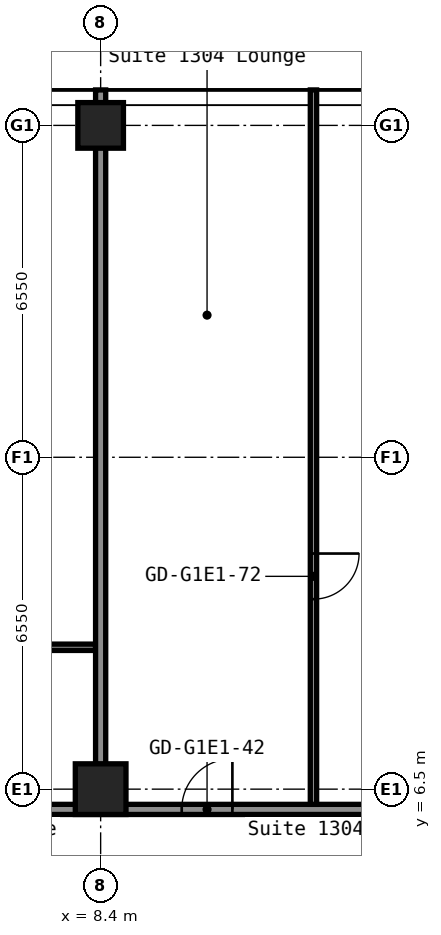
"""IFC4 building model, lengths in metres.
Left out: names, types, materials, properties, quantities, classifications, styles, units other than length and angle.
Written with IfcOpenShell. Run it as: python <this file> out.ifc"""

import sys

from ifc_helpers import new_model, si_unit, direction, frame, frame_2d, origin, origin_2d, place, context, subcontext, project, spatial, rectangle, hollow_rectangle, extrude, element, fill, save


model = new_model("IFC4")
c1 = context("Model", 3, precision=1e-05, world=origin(), true_north=direction((0.0, 1.0)))
c2 = subcontext(c1, "Body", "Model", "MODEL_VIEW")
j1 = project(units=[si_unit("LENGTHUNIT", "METRE"), si_unit("PLANEANGLEUNIT", "RADIAN")], contexts=[c1])
p1 = place(None, origin())
s1 = spatial("IfcSite", under=j1, at=p1, CompositionType="ELEMENT")
p2 = place(p1, origin())
s2 = spatial("IfcBuilding", under=s1, at=p2, CompositionType="ELEMENT")
p3 = place(p2, frame((0.0, 0.0, 48.6)))
s3 = spatial("IfcBuildingStorey", under=s2, at=p3, CompositionType="ELEMENT", Elevation=48.6)
p4 = place(p3, frame((8.4, 6.5, 0.0), z_axis=(0.0, 0.0, 1.0), x_axis=(1.0, 0.0, 0.0)))
e1 = element("IfcColumn", 1, at=p4, inside=s3, PredefinedType="COLUMN", context=c2, shape_type="SweptSolid", body=[
    extrude(hollow_rectangle(XDim=1.0, YDim=1.0, WallThickness=0.04, at=origin_2d()), origin(), (0.0, 0.0, 1.0), 2.8),
])
p5 = place(p3, frame((8.4, 19.6, 0.0), z_axis=(0.0, 0.0, 1.0), x_axis=(1.0, 0.0, 0.0)))
e2 = element("IfcColumn", 2, at=p5, inside=s3, PredefinedType="COLUMN", context=c2, shape_type="SweptSolid", body=[
    extrude(hollow_rectangle(XDim=0.9, YDim=0.9, WallThickness=0.036, at=origin_2d()), origin(), (0.0, 0.0, 1.0), 2.8),
])
p6 = place(p3, frame((-16.8, 6.1, 0.0), z_axis=(0.0, 0.0, 1.0), x_axis=(1.0, 0.0, 0.0)))
e3 = element("IfcWall", 3, at=p6, inside=s3, PredefinedType="PARTITIONING", context=c2, shape_type="SweptSolid", body=[
    extrude(rectangle(XDim=33.6, YDim=0.2, at=frame_2d((16.8, 0.0))), origin(), (0.0, 0.0, 1.0), 2.8),
])
p7 = place(p6, frame((1.6, 0.0, 0.0)))
e4 = element("IfcOpeningElement", 4, at=p7, cuts=e3, PredefinedType="OPENING", context=c2, shape_type="SweptSolid", body=[
    extrude(rectangle(XDim=1.0, YDim=2.1, at=frame_2d((0.5, 1.05))), frame((0.0, 0.11, 0.0), z_axis=(0.0, -1.0, 0.0), x_axis=(1.0, 0.0, 0.0)), (0.0, 0.0, 1.0), 0.22),
])
p8 = place(p6, frame((10.0, 0.0, 0.0)))
e5 = element("IfcOpeningElement", 5, at=p8, cuts=e3, PredefinedType="OPENING", context=c2, shape_type="SweptSolid", body=[
    extrude(rectangle(XDim=1.0, YDim=2.1, at=frame_2d((0.5, 1.05))), frame((0.0, 0.11, 0.0), z_axis=(0.0, -1.0, 0.0), x_axis=(1.0, 0.0, 0.0)), (0.0, 0.0, 1.0), 0.22),
])
p9 = place(p6, frame((18.4, 0.0, 0.0)))
e6 = element("IfcOpeningElement", 6, at=p9, cuts=e3, PredefinedType="OPENING", context=c2, shape_type="SweptSolid", body=[
    extrude(rectangle(XDim=1.0, YDim=2.1, at=frame_2d((0.5, 1.05))), frame((0.0, 0.11, 0.0), z_axis=(0.0, -1.0, 0.0), x_axis=(1.0, 0.0, 0.0)), (0.0, 0.0, 1.0), 0.22),
])
p10 = place(p6, frame((26.8, 0.0, 0.0)))
e7 = element("IfcOpeningElement", 7, at=p10, cuts=e3, PredefinedType="OPENING", context=c2, shape_type="SweptSolid", body=[
    extrude(rectangle(XDim=1.0, YDim=2.1, at=frame_2d((0.5, 1.05))), frame((0.0, 0.11, 0.0), z_axis=(0.0, -1.0, 0.0), x_axis=(1.0, 0.0, 0.0)), (0.0, 0.0, 1.0), 0.22),
])
p11 = place(p3, frame((5.462, 9.3, 0.0), z_axis=(0.0, 0.0, 1.0), x_axis=(1.0, 0.0, 0.0)))
e8 = element("IfcWall", 8, at=p11, inside=s3, PredefinedType="PARTITIONING", context=c2, shape_type="SweptSolid", body=[
    extrude(rectangle(XDim=2.838, YDim=0.125, at=frame_2d((1.419, 0.0))), origin(), (0.0, 0.0, 1.0), 2.8),
])
p12 = place(p11, frame((1.038, 0.0, 0.0)))
e9 = element("IfcOpeningElement", 9, at=p12, cuts=e8, PredefinedType="OPENING", context=c2, shape_type="SweptSolid", body=[
    extrude(rectangle(XDim=0.8, YDim=2.1, at=frame_2d((0.4, 1.05))), frame((0.0, 0.073, 0.0), z_axis=(0.0, -1.0, 0.0), x_axis=(1.0, 0.0, 0.0)), (0.0, 0.0, 1.0), 0.145),
])
p13 = place(p3, frame((8.4, 6.99, 0.0), z_axis=(0.0, 0.0, 1.0), x_axis=(0.0, 1.0, 0.0)))
e10 = element("IfcWall", 10, at=p13, inside=s3, PredefinedType="PARTITIONING", context=c2, shape_type="SweptSolid", body=[
    extrude(rectangle(XDim=13.31, YDim=0.2, at=frame_2d((6.655, 0.0))), origin(), (0.0, 0.0, 1.0), 2.8),
])
p14 = place(p3, frame((12.6, 6.2, 0.0), z_axis=(0.0, 0.0, 1.0), x_axis=(0.0, 1.0, 0.0)))
e11 = element("IfcWall", 11, at=p14, inside=s3, PredefinedType="PARTITIONING", context=c2, shape_type="SweptSolid", body=[
    extrude(rectangle(XDim=14.1, YDim=0.125, at=frame_2d((7.05, 0.0))), origin(), (0.0, 0.0, 1.0), 2.8),
])
p15 = place(p14, frame((4.05, 0.0, 0.0)))
e12 = element("IfcOpeningElement", 12, at=p15, cuts=e11, PredefinedType="OPENING", context=c2, shape_type="SweptSolid", body=[
    extrude(rectangle(XDim=0.9, YDim=2.1, at=frame_2d((0.45, 1.05))), frame((0.0, 0.073, 0.0), z_axis=(0.0, -1.0, 0.0), x_axis=(1.0, 0.0, 0.0)), (0.0, 0.0, 1.0), 0.145),
])
p16 = place(p10, origin())
e13 = element("IfcDoor", 13, at=p16, inside=s3, OperationType="SINGLE_SWING_LEFT", PredefinedType="DOOR", context=c2, shape_type="SweptSolid", body=[
    extrude(rectangle(XDim=1.0, YDim=2.1, at=frame_2d((0.5, 1.05))), frame((0.0, 0.025, 0.0), z_axis=(0.0, -1.0, 0.0), x_axis=(1.0, 0.0, 0.0)), (0.0, 0.0, 1.0), 0.05),
])
fill(e7, e13)
p17 = place(p15, origin())
e14 = element("IfcDoor", 14, at=p17, inside=s3, OperationType="SINGLE_SWING_RIGHT", PredefinedType="DOOR", context=c2, shape_type="SweptSolid", body=[
    extrude(rectangle(XDim=0.9, YDim=2.1, at=frame_2d((0.45, 1.05))), frame((0.0, 0.025, 0.0), z_axis=(0.0, -1.0, 0.0), x_axis=(1.0, 0.0, 0.0)), (0.0, 0.0, 1.0), 0.05),
])
fill(e12, e14)
save(model, sys.argv[1])
